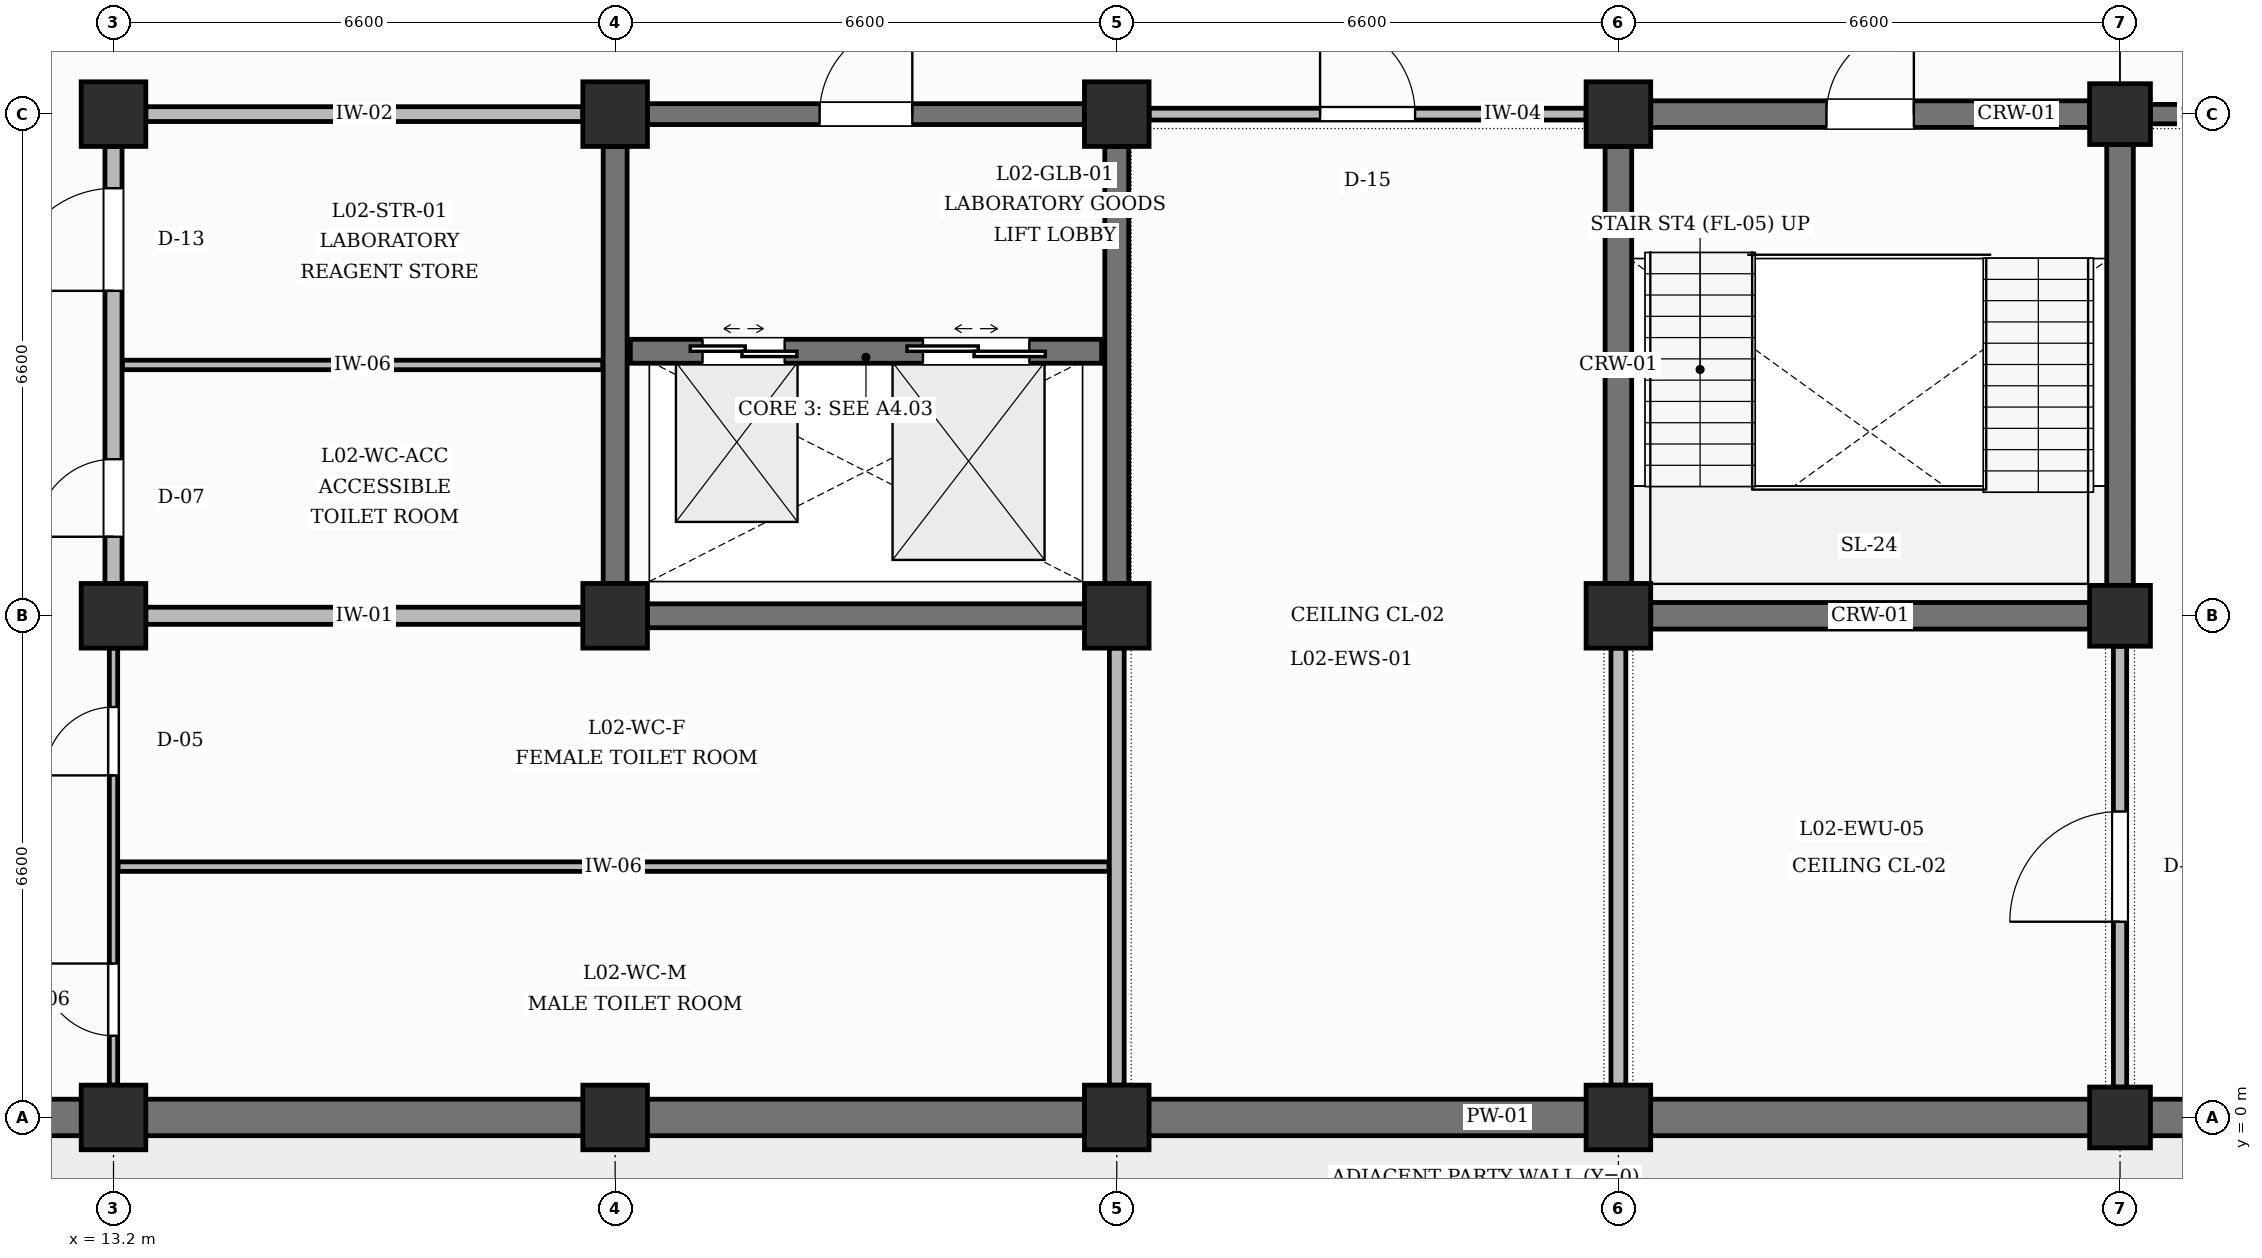
"""IFC4 building model, lengths in metres.
Left out: names, types, materials, properties, quantities, classifications, styles, units other than length and angle.
Written with IfcOpenShell. Run it as: python <this file> out.ifc"""

import sys

from ifc_helpers import new_model, si_unit, direction, frame, frame_2d, origin, origin_2d, place, context, subcontext, project, spatial, rectangle, extrude, element, fill, save


model = new_model("IFC4")
c1 = context("Model", 3, precision=1e-05, world=origin(), true_north=direction((0.0, 1.0)))
c2 = subcontext(c1, "Body", "Model", "MODEL_VIEW")
j1 = project(units=[si_unit("LENGTHUNIT", "METRE"), si_unit("PLANEANGLEUNIT", "RADIAN")], contexts=[c1])
p1 = place(None, origin())
s1 = spatial("IfcSite", under=j1, at=p1, CompositionType="ELEMENT")
p2 = place(p1, origin())
s2 = spatial("IfcBuilding", under=s1, at=p2, CompositionType="ELEMENT")
p3 = place(p2, frame((0.0, 0.0, 10.2)))
s3 = spatial("IfcBuildingStorey", under=s2, at=p3, CompositionType="ELEMENT", Elevation=10.2)
for number, where, z_axis, x_axis in (
    (1, (13.2, 0.0, 0.0), (0.0, 0.0, 1.0), (1.0, 0.0, 0.0)),
    (2, (13.2, 6.6, 0.0), (0.0, 0.0, 1.0), (1.0, 0.0, 0.0)),
    (3, (13.2, 13.2, 0.0), (0.0, 0.0, 1.0), (1.0, 0.0, 0.0)),
    (4, (19.8, 0.0, 0.0), (0.0, 0.0, 1.0), (1.0, 0.0, 0.0)),
    (5, (19.8, 6.6, 0.0), (0.0, 0.0, 1.0), (1.0, 0.0, 0.0)),
    (6, (19.8, 13.2, 0.0), (0.0, 0.0, 1.0), (1.0, 0.0, 0.0)),
    (7, (26.4, 0.0, 0.0), (0.0, 0.0, 1.0), (1.0, 0.0, 0.0)),
    (8, (26.4, 6.6, 0.0), (0.0, 0.0, 1.0), (1.0, 0.0, 0.0)),
    (9, (26.4, 13.2, 0.0), (0.0, 0.0, 1.0), (1.0, 0.0, 0.0)),
    (10, (33.0, 0.0, 0.0), (0.0, 0.0, 1.0), (1.0, 0.0, 0.0)),
    (11, (33.0, 6.6, 0.0), (0.0, 0.0, 1.0), (1.0, 0.0, 0.0)),
    (12, (33.0, 13.2, 0.0), (0.0, 0.0, 1.0), (1.0, 0.0, 0.0)),
):
    element("IfcColumn", number, at=place(p3, frame(where, z_axis=z_axis, x_axis=x_axis)), inside=s3, PredefinedType="COLUMN", context=c2, shape_type="SweptSolid", body=[
        extrude(rectangle(XDim=0.85, YDim=0.85, at=origin_2d()), origin(), (0.0, 0.0, 1.0), 4.2),
    ])
for number, where, z_axis, x_axis in (
    (13, (39.6, 0.0, 0.0), (0.0, 0.0, 1.0), (1.0, 0.0, 0.0)),
    (14, (39.6, 6.6, 0.0), (0.0, 0.0, 1.0), (1.0, 0.0, 0.0)),
    (15, (39.6, 13.2, 0.0), (0.0, 0.0, 1.0), (1.0, 0.0, 0.0)),
):
    element("IfcColumn", number, at=place(p3, frame(where, z_axis=z_axis, x_axis=x_axis)), inside=s3, PredefinedType="COLUMN", context=c2, shape_type="SweptSolid", body=[
        extrude(rectangle(XDim=0.8, YDim=0.8, at=origin_2d()), origin(), (0.0, 0.0, 1.0), 4.2),
    ])
for number, where, z_axis, x_axis in (
    (16, (7.025, 0.0, 0.0), (0.0, 0.0, 1.0), (1.0, 0.0, 0.0)),
    (17, (13.625, 0.0, 0.0), (0.0, 0.0, 1.0), (1.0, 0.0, 0.0)),
    (18, (20.225, 0.0, 0.0), (0.0, 0.0, 1.0), (1.0, 0.0, 0.0)),
    (19, (26.825, 0.0, 0.0), (0.0, 0.0, 1.0), (1.0, 0.0, 0.0)),
):
    element("IfcWall", number, at=place(p3, frame(where, z_axis=z_axis, x_axis=x_axis)), inside=s3, PredefinedType="SOLIDWALL", context=c2, shape_type="SweptSolid", body=[
        extrude(rectangle(XDim=5.75, YDim=0.48, at=frame_2d((2.875, 0.0))), origin(), (0.0, 0.0, 1.0), 3.25),
    ])
p4 = place(p3, frame((33.425, 0.0, 0.0), z_axis=(0.0, 0.0, 1.0), x_axis=(1.0, 0.0, 0.0)))
e20 = element("IfcWall", 20, at=p4, inside=s3, PredefinedType="SOLIDWALL", context=c2, shape_type="SweptSolid", body=[
    extrude(rectangle(XDim=5.775, YDim=0.48, at=frame_2d((2.887, 0.0))), origin(), (0.0, 0.0, 1.0), 3.25),
])
p5 = place(p3, frame((40.0, 0.0, 0.0), z_axis=(0.0, 0.0, 1.0), x_axis=(1.0, 0.0, 0.0)))
e21 = element("IfcWall", 21, at=p5, inside=s3, PredefinedType="SOLIDWALL", context=c2, shape_type="SweptSolid", body=[
    extrude(rectangle(XDim=5.8, YDim=0.48, at=frame_2d((2.9, 0.0))), origin(), (0.0, 0.0, 1.0), 3.25),
])
p6 = place(p3, frame((33.425, 6.6, 0.0), z_axis=(0.0, 0.0, 1.0), x_axis=(1.0, 0.0, 0.0)))
e22 = element("IfcWall", 22, at=p6, inside=s3, PredefinedType="SHEAR", context=c2, shape_type="SweptSolid", body=[
    extrude(rectangle(XDim=5.775, YDim=0.35, at=frame_2d((2.887, 0.0))), origin(), (0.0, 0.0, 1.0), 3.0),
])
p7 = place(p3, frame((33.425, 13.2, 0.0), z_axis=(0.0, 0.0, 1.0), x_axis=(1.0, 0.0, 0.0)))
e23 = element("IfcWall", 23, at=p7, inside=s3, PredefinedType="SHEAR", context=c2, shape_type="SweptSolid", body=[
    extrude(rectangle(XDim=5.775, YDim=0.35, at=frame_2d((2.887, 0.0))), origin(), (0.0, 0.0, 1.0), 3.1),
])
p8 = place(p7, frame((2.312, 0.0, 0.0)))
e24 = element("IfcOpeningElement", 24, at=p8, cuts=e23, PredefinedType="OPENING", context=c2, shape_type="SweptSolid", body=[
    extrude(rectangle(XDim=1.15, YDim=2.2, at=frame_2d((0.575, 1.1))), frame((0.0, 0.185, 0.0), z_axis=(0.0, -1.0, 0.0), x_axis=(1.0, 0.0, 0.0)), (0.0, 0.0, 1.0), 0.37),
])
p9 = place(p3, frame((33.0, 7.025, 0.0), z_axis=(0.0, 0.0, 1.0), x_axis=(0.0, 1.0, 0.0)))
e25 = element("IfcWall", 25, at=p9, inside=s3, PredefinedType="SHEAR", context=c2, shape_type="SweptSolid", body=[
    extrude(rectangle(XDim=5.75, YDim=0.35, at=frame_2d((2.875, 0.0))), origin(), (0.0, 0.0, 1.0), 3.1),
])
p10 = place(p3, frame((39.6, 7.0, 0.0), z_axis=(0.0, 0.0, 1.0), x_axis=(0.0, 1.0, 0.0)))
e26 = element("IfcWall", 26, at=p10, inside=s3, PredefinedType="SHEAR", context=c2, shape_type="SweptSolid", body=[
    extrude(rectangle(XDim=5.8, YDim=0.35, at=frame_2d((2.9, 0.0))), origin(), (0.0, 0.0, 1.0), 3.1),
])
p11 = place(p3, frame((20.225, 6.6, 0.0), z_axis=(0.0, 0.0, 1.0), x_axis=(1.0, 0.0, 0.0)))
e27 = element("IfcWall", 27, at=p11, inside=s3, PredefinedType="SHEAR", context=c2, shape_type="SweptSolid", body=[
    extrude(rectangle(XDim=5.75, YDim=0.315, at=frame_2d((2.875, 0.0))), origin(), (0.0, 0.0, 1.0), 3.0),
])
for number, where, z_axis, x_axis in (
    (28, (19.8, 7.025, 0.0), (0.0, 0.0, 1.0), (0.0, 1.0, 0.0)),
    (29, (26.4, 7.025, 0.0), (0.0, 0.0, 1.0), (0.0, 1.0, 0.0)),
):
    element("IfcWall", number, at=place(p3, frame(where, z_axis=z_axis, x_axis=x_axis)), inside=s3, PredefinedType="SHEAR", context=c2, shape_type="SweptSolid", body=[
        extrude(rectangle(XDim=5.75, YDim=0.315, at=frame_2d((2.875, 0.0))), origin(), (0.0, 0.0, 1.0), 3.1),
    ])
p12 = place(p3, frame((20.225, 13.2, 0.0), z_axis=(0.0, 0.0, 1.0), x_axis=(1.0, 0.0, 0.0)))
e30 = element("IfcWall", 30, at=p12, inside=s3, PredefinedType="SHEAR", context=c2, shape_type="SweptSolid", body=[
    extrude(rectangle(XDim=5.75, YDim=0.275, at=frame_2d((2.875, 0.0))), origin(), (0.0, 0.0, 1.0), 3.1),
])
p13 = place(p12, frame((2.265, 0.0, 0.0)))
e31 = element("IfcOpeningElement", 31, at=p13, cuts=e30, PredefinedType="OPENING", context=c2, shape_type="SweptSolid", body=[
    extrude(rectangle(XDim=1.22, YDim=2.15, at=frame_2d((0.61, 1.075))), frame((0.0, 0.147, 0.0), z_axis=(0.0, -1.0, 0.0), x_axis=(1.0, 0.0, 0.0)), (0.0, 0.0, 1.0), 0.295),
])
p14 = place(p3, frame((20.0, 10.08, 0.0), z_axis=(0.0, 0.0, 1.0), x_axis=(1.0, 0.0, 0.0)))
e32 = element("IfcWall", 32, at=p14, inside=s3, PredefinedType="SHEAR", context=c2, shape_type="SweptSolid", body=[
    extrude(rectangle(XDim=6.2, YDim=0.315, at=frame_2d((3.1, 0.0))), origin(), (0.0, 0.0, 1.0), 3.85),
])
p15 = place(p14, frame((0.95, 0.0, 0.0)))
e33 = element("IfcOpeningElement", 33, at=p15, cuts=e32, PredefinedType="OPENING", context=c2, shape_type="SweptSolid", body=[
    extrude(rectangle(XDim=1.08, YDim=2.15, at=frame_2d((0.54, 1.075))), frame((0.0, 0.167, 0.0), z_axis=(0.0, -1.0, 0.0), x_axis=(1.0, 0.0, 0.0)), (0.0, 0.0, 1.0), 0.335),
])
p16 = place(p14, frame((3.85, 0.0, 0.0)))
e34 = element("IfcOpeningElement", 34, at=p16, cuts=e32, PredefinedType="OPENING", context=c2, shape_type="SweptSolid", body=[
    extrude(rectangle(XDim=1.4, YDim=2.35, at=frame_2d((0.7, 1.175))), frame((0.0, 0.167, 0.0), z_axis=(0.0, -1.0, 0.0), x_axis=(1.0, 0.0, 0.0)), (0.0, 0.0, 1.0), 0.335),
])
p17 = place(p3, frame((13.2, 0.425, 0.0), z_axis=(0.0, 0.0, 1.0), x_axis=(0.0, 1.0, 0.0)))
e35 = element("IfcWall", 35, at=p17, inside=s3, PredefinedType="PARTITIONING", context=c2, shape_type="SweptSolid", body=[
    extrude(rectangle(XDim=5.75, YDim=0.11, at=frame_2d((2.875, 0.0))), origin(), (0.0, 0.0, 1.0), 3.1),
])
p18 = place(p17, frame((0.65, 0.0, 0.0)))
e36 = element("IfcOpeningElement", 36, at=p18, cuts=e35, PredefinedType="OPENING", context=c2, shape_type="SweptSolid", body=[
    extrude(rectangle(XDim=0.95, YDim=2.1, at=frame_2d((0.475, 1.05))), frame((0.0, 0.065, 0.0), z_axis=(0.0, -1.0, 0.0), x_axis=(1.0, 0.0, 0.0)), (0.0, 0.0, 1.0), 0.13),
])
p19 = place(p17, frame((4.075, 0.0, 0.0)))
e37 = element("IfcOpeningElement", 37, at=p19, cuts=e35, PredefinedType="OPENING", context=c2, shape_type="SweptSolid", body=[
    extrude(rectangle(XDim=0.9, YDim=2.1, at=frame_2d((0.45, 1.05))), frame((0.0, 0.065, 0.0), z_axis=(0.0, -1.0, 0.0), x_axis=(1.0, 0.0, 0.0)), (0.0, 0.0, 1.0), 0.13),
])
p20 = place(p3, frame((26.4, 0.425, 0.0), z_axis=(0.0, 0.0, 1.0), x_axis=(0.0, 1.0, 0.0)))
e38 = element("IfcWall", 38, at=p20, inside=s3, PredefinedType="PARTITIONING", context=c2, shape_type="SweptSolid", body=[
    extrude(rectangle(XDim=5.75, YDim=0.195, at=frame_2d((2.875, 0.0))), origin(), (0.0, 0.0, 1.0), 3.1),
])
p21 = place(p3, frame((13.625, 6.6, 0.0), z_axis=(0.0, 0.0, 1.0), x_axis=(1.0, 0.0, 0.0)))
e39 = element("IfcWall", 39, at=p21, inside=s3, PredefinedType="PARTITIONING", context=c2, shape_type="SweptSolid", body=[
    extrude(rectangle(XDim=5.75, YDim=0.225, at=frame_2d((2.875, 0.0))), origin(), (0.0, 0.0, 1.0), 3.1),
])
p22 = place(p3, frame((13.2, 7.025, 0.0), z_axis=(0.0, 0.0, 1.0), x_axis=(0.0, 1.0, 0.0)))
e40 = element("IfcWall", 40, at=p22, inside=s3, PredefinedType="PARTITIONING", context=c2, shape_type="SweptSolid", body=[
    extrude(rectangle(XDim=5.75, YDim=0.225, at=frame_2d((2.875, 0.0))), origin(), (0.0, 0.0, 1.0), 3.1),
])
p23 = place(p22, frame((0.615, 0.0, 0.0)))
e41 = element("IfcOpeningElement", 41, at=p23, cuts=e40, PredefinedType="OPENING", context=c2, shape_type="SweptSolid", body=[
    extrude(rectangle(XDim=1.02, YDim=2.15, at=frame_2d((0.51, 1.075))), frame((0.0, 0.123, 0.0), z_axis=(0.0, -1.0, 0.0), x_axis=(1.0, 0.0, 0.0)), (0.0, 0.0, 1.0), 0.245),
])
p24 = place(p22, frame((3.85, 0.0, 0.0)))
e42 = element("IfcOpeningElement", 42, at=p24, cuts=e40, PredefinedType="OPENING", context=c2, shape_type="SweptSolid", body=[
    extrude(rectangle(XDim=1.35, YDim=2.3, at=frame_2d((0.675, 1.15))), frame((0.0, 0.123, 0.0), z_axis=(0.0, -1.0, 0.0), x_axis=(1.0, 0.0, 0.0)), (0.0, 0.0, 1.0), 0.245),
])
p25 = place(p3, frame((13.625, 13.2, 0.0), z_axis=(0.0, 0.0, 1.0), x_axis=(1.0, 0.0, 0.0)))
e43 = element("IfcWall", 43, at=p25, inside=s3, PredefinedType="PARTITIONING", context=c2, shape_type="SweptSolid", body=[
    extrude(rectangle(XDim=5.75, YDim=0.195, at=frame_2d((2.875, 0.0))), origin(), (0.0, 0.0, 1.0), 3.0),
])
p26 = place(p3, frame((33.0, 0.425, 0.0), z_axis=(0.0, 0.0, 1.0), x_axis=(0.0, 1.0, 0.0)))
e44 = element("IfcWall", 44, at=p26, inside=s3, PredefinedType="PARTITIONING", context=c2, shape_type="SweptSolid", body=[
    extrude(rectangle(XDim=5.75, YDim=0.195, at=frame_2d((2.875, 0.0))), origin(), (0.0, 0.0, 1.0), 3.1),
])
p27 = place(p3, frame((26.825, 13.2, 0.0), z_axis=(0.0, 0.0, 1.0), x_axis=(1.0, 0.0, 0.0)))
e45 = element("IfcWall", 45, at=p27, inside=s3, PredefinedType="PARTITIONING", context=c2, shape_type="SweptSolid", body=[
    extrude(rectangle(XDim=5.75, YDim=0.155, at=frame_2d((2.875, 0.0))), origin(), (0.0, 0.0, 1.0), 3.0),
])
p28 = place(p27, frame((2.25, 0.0, 0.0)))
e46 = element("IfcOpeningElement", 46, at=p28, cuts=e45, PredefinedType="OPENING", context=c2, shape_type="SweptSolid", body=[
    extrude(rectangle(XDim=1.25, YDim=2.25, at=frame_2d((0.625, 1.125))), frame((0.0, 0.087, 0.0), z_axis=(0.0, -1.0, 0.0), x_axis=(1.0, 0.0, 0.0)), (0.0, 0.0, 1.0), 0.175),
])
p29 = place(p3, frame((39.6, 0.4, 0.0), z_axis=(0.0, 0.0, 1.0), x_axis=(0.0, 1.0, 0.0)))
e47 = element("IfcWall", 47, at=p29, inside=s3, PredefinedType="PARTITIONING", context=c2, shape_type="SweptSolid", body=[
    extrude(rectangle(XDim=5.8, YDim=0.175, at=frame_2d((2.9, 0.0))), origin(), (0.0, 0.0, 1.0), 3.1),
])
p30 = place(p29, frame((2.175, 0.0, 0.0)))
e48 = element("IfcOpeningElement", 48, at=p30, cuts=e47, PredefinedType="OPENING", context=c2, shape_type="SweptSolid", body=[
    extrude(rectangle(XDim=1.45, YDim=2.25, at=frame_2d((0.725, 1.125))), frame((0.0, 0.097, 0.0), z_axis=(0.0, -1.0, 0.0), x_axis=(1.0, 0.0, 0.0)), (0.0, 0.0, 1.0), 0.195),
])
p31 = place(p3, frame((40.0, 13.2, 0.0), z_axis=(0.0, 0.0, 1.0), x_axis=(1.0, 0.0, 0.0)))
e49 = element("IfcWall", 49, at=p31, inside=s3, PredefinedType="SHEAR", context=c2, shape_type="SweptSolid", body=[
    extrude(rectangle(XDim=5.8, YDim=0.255, at=frame_2d((2.9, 0.0))), origin(), (0.0, 0.0, 1.0), 3.0),
])
p32 = place(p31, frame((2.175, 0.0, 0.0)))
e50 = element("IfcOpeningElement", 50, at=p32, cuts=e49, PredefinedType="OPENING", context=c2, shape_type="SweptSolid", body=[
    extrude(rectangle(XDim=1.45, YDim=2.25, at=frame_2d((0.725, 1.125))), frame((0.0, 0.137, 0.0), z_axis=(0.0, -1.0, 0.0), x_axis=(1.0, 0.0, 0.0)), (0.0, 0.0, 1.0), 0.275),
])
p33 = place(p3, frame((13.26, 3.3, 0.0), z_axis=(0.0, 0.0, 1.0), x_axis=(1.0, 0.0, 0.0)))
e51 = element("IfcWall", 51, at=p33, inside=s3, PredefinedType="PARTITIONING", context=c2, shape_type="SweptSolid", body=[
    extrude(rectangle(XDim=13.038, YDim=0.125, at=frame_2d((6.519, 0.0))), origin(), (0.0, 0.0, 1.0), 3.85),
])
p34 = place(p3, frame((13.317, 9.9, 0.0), z_axis=(0.0, 0.0, 1.0), x_axis=(1.0, 0.0, 0.0)))
e52 = element("IfcWall", 52, at=p34, inside=s3, PredefinedType="PARTITIONING", context=c2, shape_type="SweptSolid", body=[
    extrude(rectangle(XDim=6.32, YDim=0.125, at=frame_2d((3.16, 0.0))), origin(), (0.0, 0.0, 1.0), 3.85),
])
p35 = place(p8, origin())
e53 = element("IfcDoor", 53, at=p35, inside=s3, OperationType="SINGLE_SWING_RIGHT", PredefinedType="DOOR", context=c2, shape_type="SweptSolid", body=[
    extrude(rectangle(XDim=1.15, YDim=2.2, at=frame_2d((0.575, 1.1))), frame((0.0, 0.025, 0.0), z_axis=(0.0, -1.0, 0.0), x_axis=(1.0, 0.0, 0.0)), (0.0, 0.0, 1.0), 0.05),
])
fill(e24, e53)
p36 = place(p15, origin())
e54 = element("IfcDoor", 54, at=p36, inside=s3, OperationType="DOUBLE_DOOR_SLIDING", PredefinedType="USERDEFINED", context=c2, shape_type="SweptSolid", body=[
    extrude(rectangle(XDim=1.08, YDim=2.15, at=frame_2d((0.54, 1.075))), frame((0.0, 0.025, 0.0), z_axis=(0.0, -1.0, 0.0), x_axis=(1.0, 0.0, 0.0)), (0.0, 0.0, 1.0), 0.05),
])
fill(e33, e54)
p37 = place(p16, origin())
e55 = element("IfcDoor", 55, at=p37, inside=s3, OperationType="DOUBLE_DOOR_SLIDING", PredefinedType="USERDEFINED", context=c2, shape_type="SweptSolid", body=[
    extrude(rectangle(XDim=1.4, YDim=2.35, at=frame_2d((0.7, 1.175))), frame((0.0, 0.025, 0.0), z_axis=(0.0, -1.0, 0.0), x_axis=(1.0, 0.0, 0.0)), (0.0, 0.0, 1.0), 0.05),
])
fill(e34, e55)
p38 = place(p13, origin())
e56 = element("IfcDoor", 56, at=p38, inside=s3, OperationType="SINGLE_SWING_RIGHT", PredefinedType="DOOR", context=c2, shape_type="SweptSolid", body=[
    extrude(rectangle(XDim=1.22, YDim=2.15, at=frame_2d((0.61, 1.075))), frame((0.0, 0.025, 0.0), z_axis=(0.0, -1.0, 0.0), x_axis=(1.0, 0.0, 0.0)), (0.0, 0.0, 1.0), 0.05),
])
fill(e31, e56)
p39 = place(p18, origin())
e57 = element("IfcDoor", 57, at=p39, inside=s3, OperationType="SINGLE_SWING_RIGHT", PredefinedType="DOOR", context=c2, shape_type="SweptSolid", body=[
    extrude(rectangle(XDim=0.95, YDim=2.1, at=frame_2d((0.475, 1.05))), frame((0.0, 0.025, 0.0), z_axis=(0.0, -1.0, 0.0), x_axis=(1.0, 0.0, 0.0)), (0.0, 0.0, 1.0), 0.05),
])
fill(e36, e57)
p40 = place(p19, origin())
e58 = element("IfcDoor", 58, at=p40, inside=s3, OperationType="SINGLE_SWING_LEFT", PredefinedType="DOOR", context=c2, shape_type="SweptSolid", body=[
    extrude(rectangle(XDim=0.9, YDim=2.1, at=frame_2d((0.45, 1.05))), frame((0.0, 0.025, 0.0), z_axis=(0.0, -1.0, 0.0), x_axis=(1.0, 0.0, 0.0)), (0.0, 0.0, 1.0), 0.05),
])
fill(e37, e58)
p41 = place(p23, origin())
e59 = element("IfcDoor", 59, at=p41, inside=s3, OperationType="SINGLE_SWING_LEFT", PredefinedType="DOOR", context=c2, shape_type="SweptSolid", body=[
    extrude(rectangle(XDim=1.02, YDim=2.15, at=frame_2d((0.51, 1.075))), frame((0.0, 0.025, 0.0), z_axis=(0.0, -1.0, 0.0), x_axis=(1.0, 0.0, 0.0)), (0.0, 0.0, 1.0), 0.05),
])
fill(e41, e59)
p42 = place(p24, origin())
e60 = element("IfcDoor", 60, at=p42, inside=s3, OperationType="SINGLE_SWING_LEFT", PredefinedType="DOOR", context=c2, shape_type="SweptSolid", body=[
    extrude(rectangle(XDim=1.35, YDim=2.3, at=frame_2d((0.675, 1.15))), frame((0.0, 0.025, 0.0), z_axis=(0.0, -1.0, 0.0), x_axis=(1.0, 0.0, 0.0)), (0.0, 0.0, 1.0), 0.05),
])
fill(e42, e60)
p43 = place(p28, origin())
e61 = element("IfcDoor", 61, at=p43, inside=s3, OperationType="SINGLE_SWING_LEFT", PredefinedType="DOOR", context=c2, shape_type="SweptSolid", body=[
    extrude(rectangle(XDim=1.25, YDim=2.25, at=frame_2d((0.625, 1.125))), frame((0.0, 0.025, 0.0), z_axis=(0.0, -1.0, 0.0), x_axis=(1.0, 0.0, 0.0)), (0.0, 0.0, 1.0), 0.05),
])
fill(e46, e61)
p44 = place(p30, origin())
e62 = element("IfcDoor", 62, at=p44, inside=s3, OperationType="SINGLE_SWING_LEFT", PredefinedType="DOOR", context=c2, shape_type="SweptSolid", body=[
    extrude(rectangle(XDim=1.45, YDim=2.25, at=frame_2d((0.725, 1.125))), frame((0.0, 0.025, 0.0), z_axis=(0.0, -1.0, 0.0), x_axis=(1.0, 0.0, 0.0)), (0.0, 0.0, 1.0), 0.05),
])
fill(e48, e62)
save(model, sys.argv[1])
